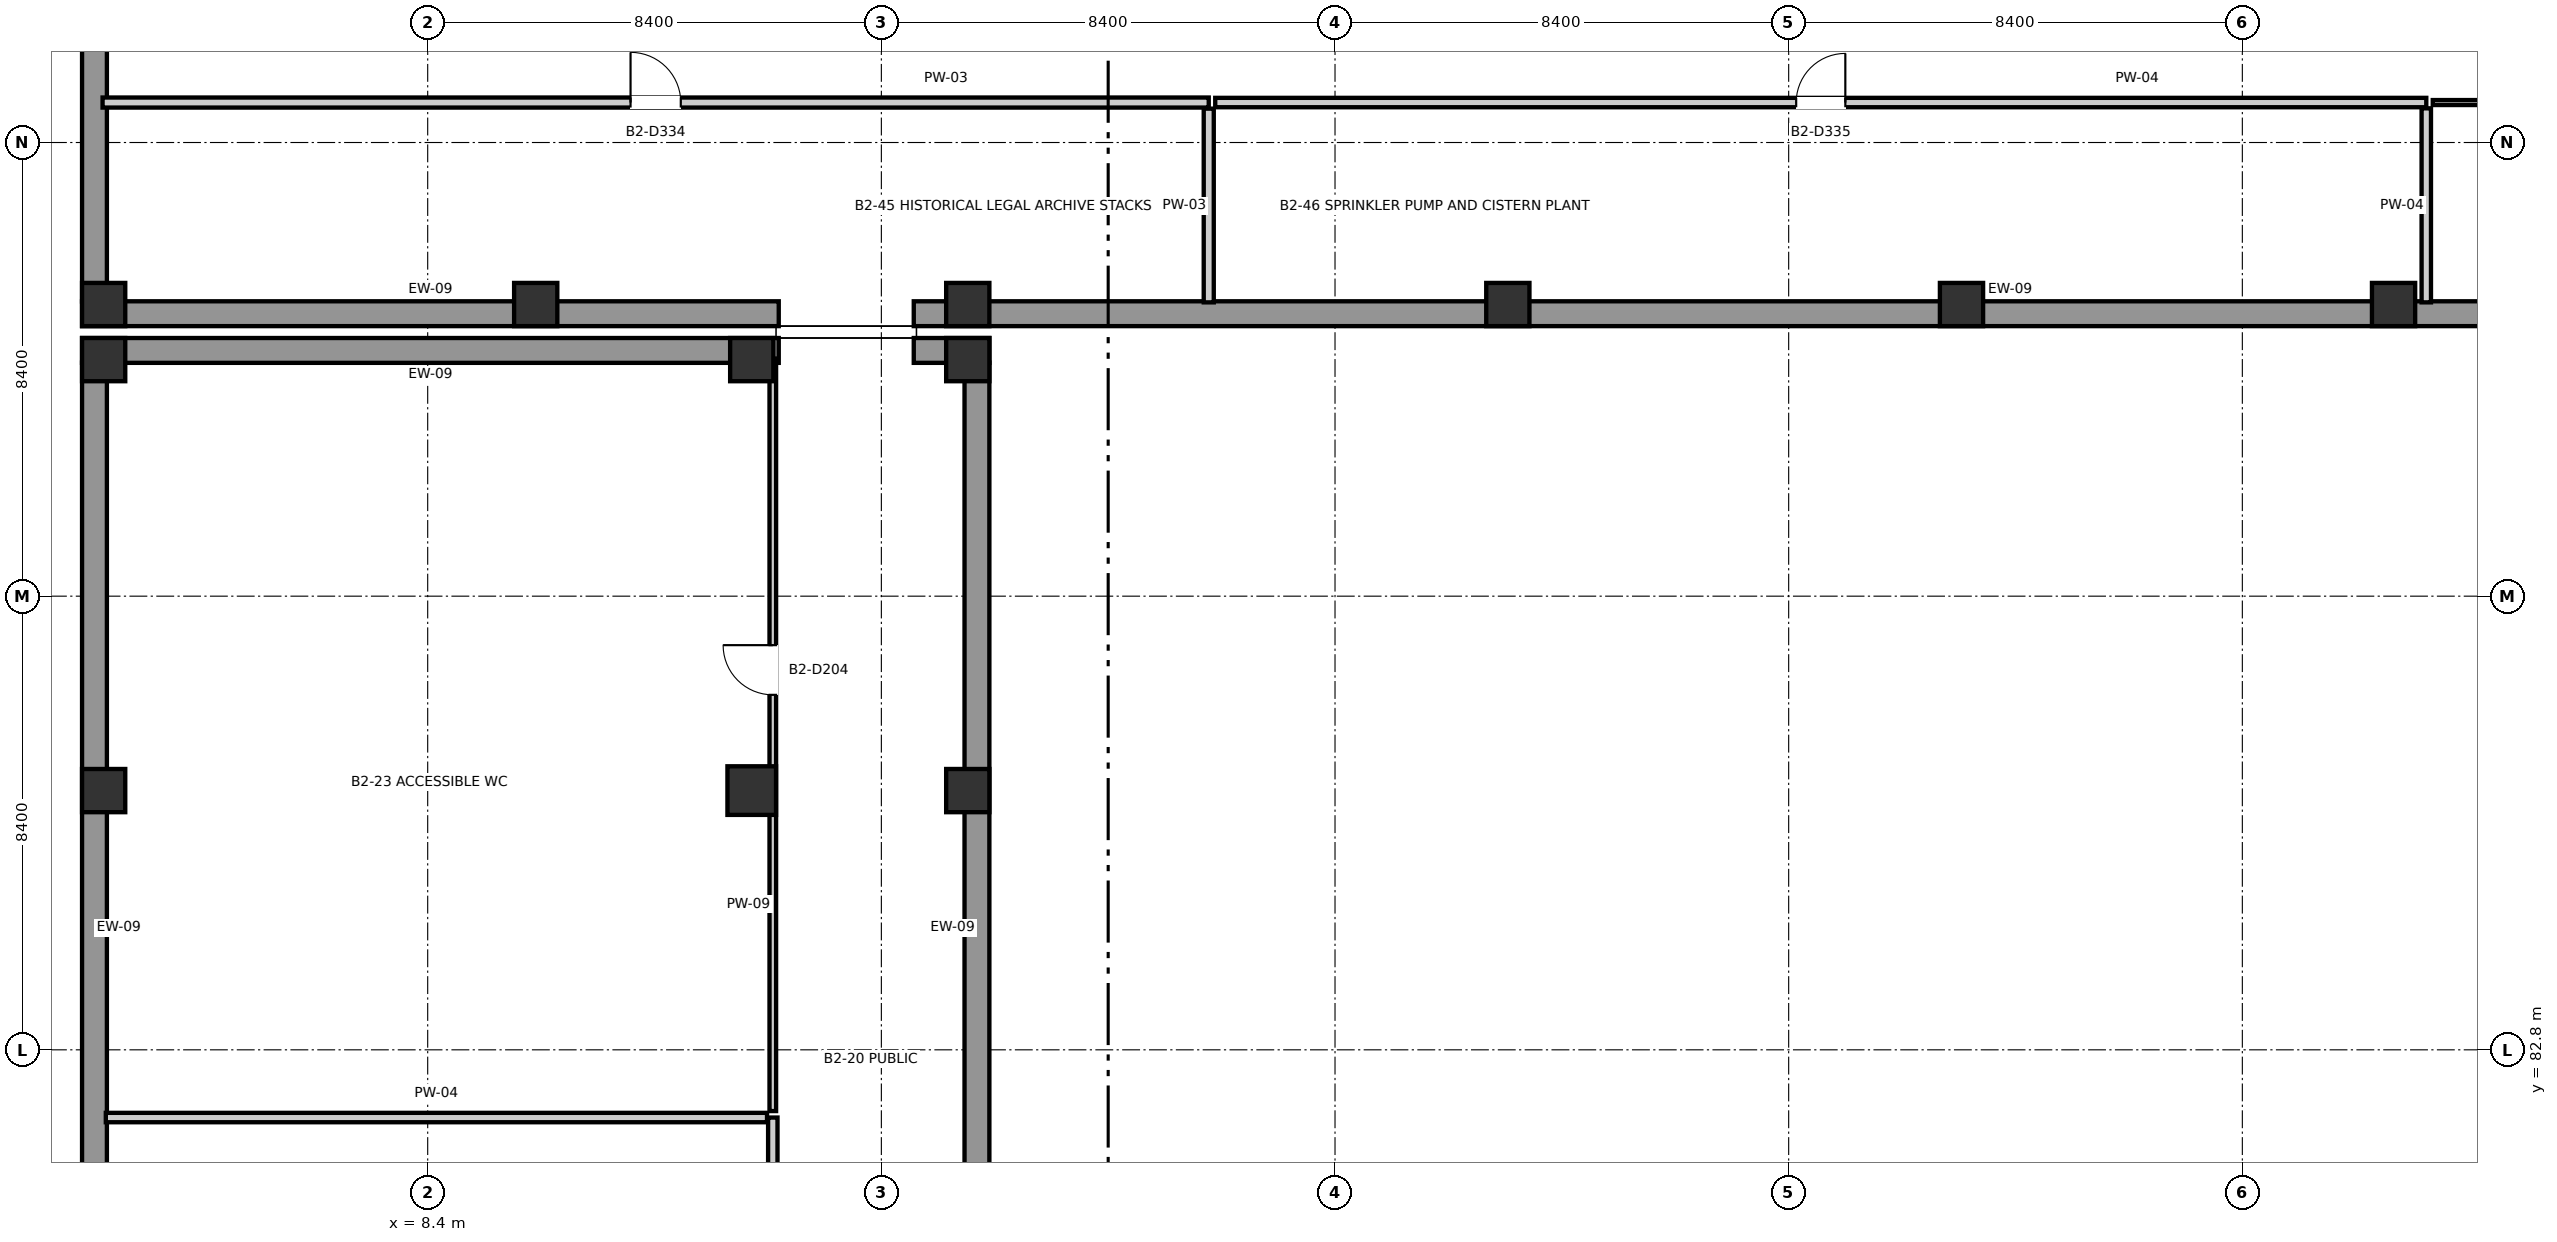
"""IFC4 building model, lengths in metres.
Left out: names, types, materials, properties, quantities, classifications, styles, units other than length and angle.
Written with IfcOpenShell. Run it as: python <this file> out.ifc"""

import sys

from ifc_helpers import new_model, si_unit, direction, frame, frame_2d, origin, origin_2d, place, context, subcontext, project, spatial, rectangle, extrude, element, fill, save


model = new_model("IFC4")
c1 = context("Model", 3, precision=1e-05, world=origin(), true_north=direction((0.0, 1.0)))
c2 = subcontext(c1, "Body", "Model", "MODEL_VIEW")
j1 = project(units=[si_unit("LENGTHUNIT", "METRE"), si_unit("PLANEANGLEUNIT", "RADIAN")], contexts=[c1])
p1 = place(None, origin())
s1 = spatial("IfcSite", under=j1, at=p1, CompositionType="ELEMENT")
p2 = place(p1, origin())
s2 = spatial("IfcBuilding", under=s1, at=p2, CompositionType="ELEMENT")
p3 = place(p2, frame((0.0, 0.0, -8.4)))
s3 = spatial("IfcBuildingStorey", under=s2, at=p3, CompositionType="ELEMENT", Elevation=-8.4)
for number, where, z_axis, x_axis in (
    (1, (2.4, 87.6, 0.0), (0.0, 0.0, 1.0), (1.0, 0.0, 0.0)),
    (2, (2.4, 95.58, 0.0), (0.0, 0.0, 1.0), (1.0, 0.0, 0.0)),
):
    element("IfcColumn", number, at=place(p3, frame(where, z_axis=z_axis, x_axis=x_axis)), inside=s3, PredefinedType="COLUMN", context=c2, shape_type="SweptSolid", body=[
        extrude(rectangle(XDim=0.8, YDim=0.8, at=origin_2d()), origin(), (0.0, 0.0, 1.0), 4.2),
    ])
p4 = place(p3, frame((14.4, 87.6, 0.0), z_axis=(0.0, 0.0, 1.0), x_axis=(1.0, 0.0, 0.0)))
e3 = element("IfcColumn", 3, at=p4, inside=s3, PredefinedType="COLUMN", context=c2, shape_type="SweptSolid", body=[
    extrude(rectangle(XDim=0.9, YDim=0.9, at=origin_2d()), origin(), (0.0, 0.0, 1.0), 4.2),
])
for number, where, z_axis, x_axis in (
    (4, (14.4, 95.58, 0.0), (0.0, 0.0, 1.0), (1.0, 0.0, 0.0)),
    (5, (18.4, 87.6, 0.0), (0.0, 0.0, 1.0), (1.0, 0.0, 0.0)),
    (6, (18.4, 95.58, 0.0), (0.0, 0.0, 1.0), (1.0, 0.0, 0.0)),
    (7, (2.4, 96.6, 0.0), (0.0, 0.0, 1.0), (1.0, 0.0, 0.0)),
    (8, (10.4, 96.6, 0.0), (0.0, 0.0, 1.0), (1.0, 0.0, 0.0)),
    (9, (18.4, 96.6, 0.0), (0.0, 0.0, 1.0), (1.0, 0.0, 0.0)),
    (10, (28.4, 96.6, 0.0), (0.0, 0.0, 1.0), (1.0, 0.0, 0.0)),
    (11, (36.8, 96.6, 0.0), (0.0, 0.0, 1.0), (1.0, 0.0, 0.0)),
    (12, (44.8, 96.6, 0.0), (0.0, 0.0, 1.0), (1.0, 0.0, 0.0)),
):
    element("IfcColumn", number, at=place(p3, frame(where, z_axis=z_axis, x_axis=x_axis)), inside=s3, PredefinedType="COLUMN", context=c2, shape_type="SweptSolid", body=[
        extrude(rectangle(XDim=0.8, YDim=0.8, at=origin_2d()), origin(), (0.0, 0.0, 1.0), 4.2),
    ])
p5 = place(p3, frame((18.57, 41.475, 0.0), z_axis=(0.0, 0.0, 1.0), x_axis=(0.0, 1.0, 0.0)))
e13 = element("IfcWall", 13, at=p5, inside=s3, PredefinedType="SOLIDWALL", context=c2, shape_type="SweptSolid", body=[
    extrude(rectangle(XDim=54.05, YDim=0.46, at=frame_2d((27.025, 0.0))), origin(), (0.0, 0.0, 1.0), 4.2),
])
p6 = place(p3, frame((18.8, 95.75, 0.0), z_axis=(0.0, 0.0, 1.0), x_axis=(-1.0, 0.0, 0.0)))
e14 = element("IfcWall", 14, at=p6, inside=s3, PredefinedType="SOLIDWALL", context=c2, shape_type="SweptSolid", body=[
    extrude(rectangle(XDim=1.4, YDim=0.46, at=frame_2d((0.7, 0.0))), origin(), (0.0, 0.0, 1.0), 4.2),
])
p7 = place(p3, frame((14.9, 95.75, 0.0), z_axis=(0.0, 0.0, 1.0), x_axis=(-1.0, 0.0, 0.0)))
e15 = element("IfcWall", 15, at=p7, inside=s3, PredefinedType="SOLIDWALL", context=c2, shape_type="SweptSolid", body=[
    extrude(rectangle(XDim=12.9, YDim=0.46, at=frame_2d((6.45, 0.0))), origin(), (0.0, 0.0, 1.0), 4.2),
])
p8 = place(p3, frame((2.23, 95.525, 0.0), z_axis=(0.0, 0.0, 1.0), x_axis=(0.0, -1.0, 0.0)))
e16 = element("IfcWall", 16, at=p8, inside=s3, PredefinedType="SOLIDWALL", context=c2, shape_type="SweptSolid", body=[
    extrude(rectangle(XDim=54.05, YDim=0.46, at=frame_2d((27.025, 0.0))), origin(), (0.0, 0.0, 1.0), 4.2),
])
p9 = place(p3, frame((2.0, 96.43, 0.0), z_axis=(0.0, 0.0, 1.0), x_axis=(1.0, 0.0, 0.0)))
e17 = element("IfcWall", 17, at=p9, inside=s3, PredefinedType="SOLIDWALL", context=c2, shape_type="SweptSolid", body=[
    extrude(rectangle(XDim=12.9, YDim=0.46, at=frame_2d((6.45, 0.0))), origin(), (0.0, 0.0, 1.0), 4.2),
])
p10 = place(p3, frame((17.4, 96.43, 0.0), z_axis=(0.0, 0.0, 1.0), x_axis=(1.0, 0.0, 0.0)))
e18 = element("IfcWall", 18, at=p10, inside=s3, PredefinedType="SOLIDWALL", context=c2, shape_type="SweptSolid", body=[
    extrude(rectangle(XDim=49.4, YDim=0.46, at=frame_2d((24.7, 0.0))), origin(), (0.0, 0.0, 1.0), 4.2),
])
p11 = place(p3, frame((2.23, 112.545, 0.0), z_axis=(0.0, 0.0, 1.0), x_axis=(0.0, -1.0, 0.0)))
e19 = element("IfcWall", 19, at=p11, inside=s3, PredefinedType="SOLIDWALL", context=c2, shape_type="SweptSolid", body=[
    extrude(rectangle(XDim=15.89, YDim=0.46, at=frame_2d((7.945, 0.0))), origin(), (0.0, 0.0, 1.0), 4.2),
])
p12 = place(p3, frame((14.79, 66.082, 0.0), z_axis=(0.0, 0.0, 1.0), x_axis=(0.0, 1.0, 0.0)))
e20 = element("IfcWall", 20, at=p12, inside=s3, PredefinedType="PARTITIONING", context=c2, shape_type="SweptSolid", body=[
    extrude(rectangle(XDim=15.464, YDim=0.174, at=frame_2d((7.732, 0.0))), origin(), (0.0, 0.0, 1.0), 3.11),
])
p13 = place(p12, frame((8.877, 0.0, 0.0)))
e21 = element("IfcOpeningElement", 21, at=p13, cuts=e20, PredefinedType="OPENING", context=c2, shape_type="SweptSolid", body=[
    extrude(rectangle(XDim=0.91, YDim=2.04, at=frame_2d((0.455, 1.02))), frame((0.0, 0.102, 0.0), z_axis=(0.0, -1.0, 0.0), x_axis=(1.0, 0.0, 0.0)), (0.0, 0.0, 1.0), 0.204),
])
p14 = place(p3, frame((2.44, 81.546, 0.0), z_axis=(0.0, 0.0, 1.0), x_axis=(1.0, 0.0, 0.0)))
e22 = element("IfcWall", 22, at=p14, inside=s3, PredefinedType="PARTITIONING", context=c2, shape_type="SweptSolid", body=[
    extrude(rectangle(XDim=12.243, YDim=0.174, at=frame_2d((6.122, 0.0))), origin(), (0.0, 0.0, 1.0), 3.88),
])
p15 = place(p3, frame((14.79, 81.666, 0.0), z_axis=(0.0, 0.0, 1.0), x_axis=(0.0, 1.0, 0.0)))
e23 = element("IfcWall", 23, at=p15, inside=s3, PredefinedType="PARTITIONING", context=c2, shape_type="SweptSolid", body=[
    extrude(rectangle(XDim=13.934, YDim=0.122, at=frame_2d((6.967, 0.0))), origin(), (0.0, 0.0, 1.0), 3.88),
])
p16 = place(p15, frame((7.707, 0.0, 0.0)))
e24 = element("IfcOpeningElement", 24, at=p16, cuts=e23, PredefinedType="OPENING", context=c2, shape_type="SweptSolid", body=[
    extrude(rectangle(XDim=0.92, YDim=2.06, at=frame_2d((0.46, 1.03))), frame((0.0, 0.076, 0.0), z_axis=(0.0, -1.0, 0.0), x_axis=(1.0, 0.0, 0.0)), (0.0, 0.0, 1.0), 0.152),
])
p17 = place(p3, frame((2.38, 100.34, 0.0), z_axis=(0.0, 0.0, 1.0), x_axis=(1.0, 0.0, 0.0)))
e25 = element("IfcWall", 25, at=p17, inside=s3, PredefinedType="PARTITIONING", context=c2, shape_type="SweptSolid", body=[
    extrude(rectangle(XDim=20.482, YDim=0.186, at=frame_2d((10.241, 0.0))), origin(), (0.0, 0.0, 1.0), 3.21),
])
p18 = place(p17, frame((9.776, 0.0, 0.0)))
e26 = element("IfcOpeningElement", 26, at=p18, cuts=e25, PredefinedType="OPENING", context=c2, shape_type="SweptSolid", body=[
    extrude(rectangle(XDim=0.93, YDim=2.08, at=frame_2d((0.465, 1.04))), frame((0.0, 0.108, 0.0), z_axis=(0.0, -1.0, 0.0), x_axis=(1.0, 0.0, 0.0)), (0.0, 0.0, 1.0), 0.216),
])
p19 = place(p3, frame((22.862, 96.64, 0.0), z_axis=(0.0, 0.0, 1.0), x_axis=(0.0, 1.0, 0.0)))
e27 = element("IfcWall", 27, at=p19, inside=s3, PredefinedType="PARTITIONING", context=c2, shape_type="SweptSolid", body=[
    extrude(rectangle(XDim=3.587, YDim=0.186, at=frame_2d((1.793, 0.0))), origin(), (0.0, 0.0, 1.0), 3.88),
])
p20 = place(p3, frame((22.982, 100.34, 0.0), z_axis=(0.0, 0.0, 1.0), x_axis=(1.0, 0.0, 0.0)))
e28 = element("IfcWall", 28, at=p20, inside=s3, PredefinedType="PARTITIONING", context=c2, shape_type="SweptSolid", body=[
    extrude(rectangle(XDim=22.424, YDim=0.174, at=frame_2d((11.212, 0.0))), origin(), (0.0, 0.0, 1.0), 3.21),
])
p21 = place(p20, frame((10.757, 0.0, 0.0)))
e29 = element("IfcOpeningElement", 29, at=p21, cuts=e28, PredefinedType="OPENING", context=c2, shape_type="SweptSolid", body=[
    extrude(rectangle(XDim=0.91, YDim=2.04, at=frame_2d((0.455, 1.02))), frame((0.0, 0.102, 0.0), z_axis=(0.0, -1.0, 0.0), x_axis=(1.0, 0.0, 0.0)), (0.0, 0.0, 1.0), 0.204),
])
p22 = place(p3, frame((45.406, 96.64, 0.0), z_axis=(0.0, 0.0, 1.0), x_axis=(0.0, 1.0, 0.0)))
e30 = element("IfcWall", 30, at=p22, inside=s3, PredefinedType="PARTITIONING", context=c2, shape_type="SweptSolid", body=[
    extrude(rectangle(XDim=3.593, YDim=0.174, at=frame_2d((1.796, 0.0))), origin(), (0.0, 0.0, 1.0), 3.88),
])
p23 = place(p3, frame((45.526, 100.34, 0.0), z_axis=(0.0, 0.0, 1.0), x_axis=(1.0, 0.0, 0.0)))
e31 = element("IfcWall", 31, at=p23, inside=s3, PredefinedType="PARTITIONING", context=c2, shape_type="SweptSolid", body=[
    extrude(rectangle(XDim=20.894, YDim=0.092, at=frame_2d((10.447, 0.0))), origin(), (0.0, 0.0, 1.0), 3.21),
])
p24 = place(p23, frame((9.982, 0.0, 0.0)))
e32 = element("IfcOpeningElement", 32, at=p24, cuts=e31, PredefinedType="OPENING", context=c2, shape_type="SweptSolid", body=[
    extrude(rectangle(XDim=0.93, YDim=2.08, at=frame_2d((0.465, 1.04))), frame((0.0, 0.061, 0.0), z_axis=(0.0, -1.0, 0.0), x_axis=(1.0, 0.0, 0.0)), (0.0, 0.0, 1.0), 0.122),
])
p25 = place(p16, frame((0.92, 0.0, 0.0), z_axis=(0.0, 0.0, 1.0), x_axis=(-1.0, 0.0, 0.0)))
e33 = element("IfcDoor", 33, at=p25, inside=s3, OperationType="SINGLE_SWING_RIGHT", PredefinedType="DOOR", context=c2, shape_type="SweptSolid", body=[
    extrude(rectangle(XDim=0.92, YDim=2.06, at=frame_2d((0.46, 1.03))), frame((0.0, 0.025, 0.0), z_axis=(0.0, -1.0, 0.0), x_axis=(1.0, 0.0, 0.0)), (0.0, 0.0, 1.0), 0.05),
])
fill(e24, e33)
p26 = place(p18, frame((0.93, 0.0, 0.0), z_axis=(0.0, 0.0, 1.0), x_axis=(-1.0, 0.0, 0.0)))
e34 = element("IfcDoor", 34, at=p26, inside=s3, OperationType="SINGLE_SWING_LEFT", PredefinedType="DOOR", context=c2, shape_type="SweptSolid", body=[
    extrude(rectangle(XDim=0.93, YDim=2.08, at=frame_2d((0.465, 1.04))), frame((0.0, 0.025, 0.0), z_axis=(0.0, -1.0, 0.0), x_axis=(1.0, 0.0, 0.0)), (0.0, 0.0, 1.0), 0.05),
])
fill(e26, e34)
p27 = place(p21, frame((0.91, 0.0, 0.0), z_axis=(0.0, 0.0, 1.0), x_axis=(-1.0, 0.0, 0.0)))
e35 = element("IfcDoor", 35, at=p27, inside=s3, OperationType="SINGLE_SWING_RIGHT", PredefinedType="DOOR", context=c2, shape_type="SweptSolid", body=[
    extrude(rectangle(XDim=0.91, YDim=2.04, at=frame_2d((0.455, 1.02))), frame((0.0, 0.025, 0.0), z_axis=(0.0, -1.0, 0.0), x_axis=(1.0, 0.0, 0.0)), (0.0, 0.0, 1.0), 0.05),
])
fill(e29, e35)
save(model, sys.argv[1])
